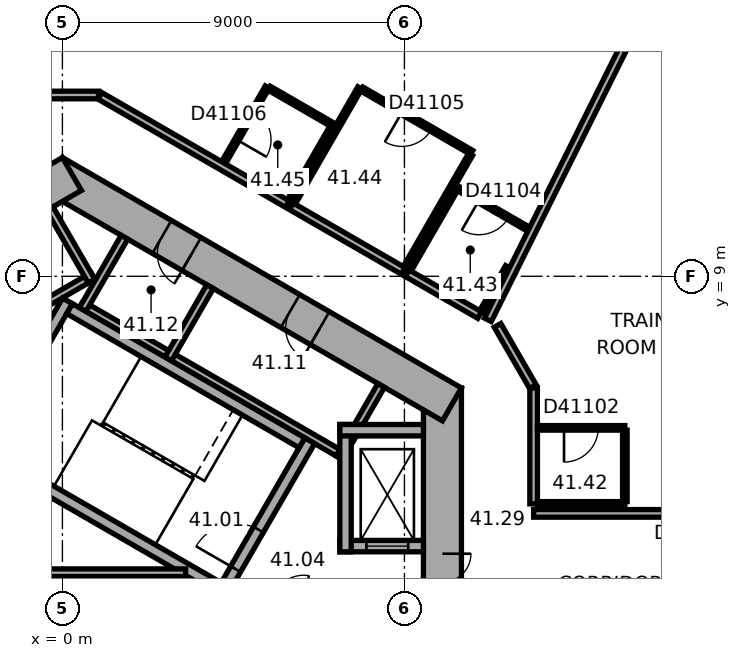
"""IFC4 building model, lengths in metres.
Left out: names, types, materials, properties, quantities, classifications, styles, units other than length and angle.
Written with IfcOpenShell. Run it as: python <this file> out.ifc"""

import sys

from ifc_helpers import new_model, si_unit, direction, frame, frame_2d, origin, place, context, subcontext, project, spatial, rectangle, extrude, element, fill, save


model = new_model("IFC4")
c1 = context("Model", 3, precision=1e-05, world=origin(), true_north=direction((0.0, 1.0)))
c2 = subcontext(c1, "Body", "Model", "MODEL_VIEW")
j1 = project(units=[si_unit("LENGTHUNIT", "METRE"), si_unit("PLANEANGLEUNIT", "RADIAN")], contexts=[c1])
p1 = place(None, origin())
s1 = spatial("IfcSite", under=j1, at=p1, CompositionType="ELEMENT")
p2 = place(p1, origin())
s2 = spatial("IfcBuilding", under=s1, at=p2, CompositionType="ELEMENT")
p3 = place(p2, frame((0.0, 0.0, 168.8)))
s3 = spatial("IfcBuildingStorey", under=s2, at=p3, CompositionType="ELEMENT", Elevation=168.8)
p4 = place(p3, frame((10.0, -6.062, 0.0), z_axis=(0.0, 0.0, 1.0), x_axis=(0.0, 1.0, 0.0)))
e1 = element("IfcWall", 1, at=p4, inside=s3, PredefinedType="SHEAR", context=c2, shape_type="SweptSolid", body=[
    extrude(rectangle(XDim=12.125, YDim=1.0, at=frame_2d((6.062, 0.0))), origin(), (0.0, 0.0, 1.0), 3.7),
])
p5 = place(p4, frame((6.262, 0.0, 0.0)))
e2 = element("IfcOpeningElement", 2, at=p5, cuts=e1, PredefinedType="OPENING", context=c2, shape_type="SweptSolid", body=[
    extrude(rectangle(XDim=1.5, YDim=2.1, at=frame_2d((0.75, 1.05))), frame((0.0, 0.51, 0.0), z_axis=(0.0, -1.0, 0.0), x_axis=(1.0, 0.0, 0.0)), (0.0, 0.0, 1.0), 1.02),
])
p6 = place(p4, frame((1.812, 0.0, 0.0)))
e3 = element("IfcOpeningElement", 3, at=p6, cuts=e1, PredefinedType="OPENING", context=c2, shape_type="SweptSolid", body=[
    extrude(rectangle(XDim=0.9, YDim=2.1, at=frame_2d((0.45, 1.05))), frame((0.0, 0.51, 0.0), z_axis=(0.0, -1.0, 0.0), x_axis=(1.0, 0.0, 0.0)), (0.0, 0.0, 1.0), 1.02),
])
p7 = place(p4, frame((4.412, 0.0, 0.0)))
e4 = element("IfcOpeningElement", 4, at=p7, cuts=e1, PredefinedType="OPENING", context=c2, shape_type="SweptSolid", body=[
    extrude(rectangle(XDim=0.9, YDim=2.1, at=frame_2d((0.45, 1.05))), frame((0.0, 0.51, 0.0), z_axis=(0.0, -1.0, 0.0), x_axis=(1.0, 0.0, 0.0)), (0.0, 0.0, 1.0), 1.02),
])
p8 = place(p3, frame((10.25, 5.629, 0.0), z_axis=(0.0, 0.0, 1.0), x_axis=(-0.866022616891, 0.50000482701, 0.0)))
e5 = element("IfcWall", 5, at=p8, inside=s3, PredefinedType="SHEAR", context=c2, shape_type="SweptSolid", body=[
    extrude(rectangle(XDim=12.125, YDim=1.0, at=frame_2d((6.062, 0.0))), origin(), (0.0, 0.0, 1.0), 3.7),
])
p9 = place(p8, frame((4.012, 0.0, 0.0)))
e6 = element("IfcOpeningElement", 6, at=p9, cuts=e5, PredefinedType="OPENING", context=c2, shape_type="SweptSolid", body=[
    extrude(rectangle(XDim=0.9, YDim=2.1, at=frame_2d((0.45, 1.05))), frame((0.0, 0.51, 0.0), z_axis=(0.0, -1.0, 0.0), x_axis=(1.0, 0.0, 0.0)), (0.0, 0.0, 1.0), 1.02),
])
p10 = place(p8, frame((7.912, 0.0, 0.0)))
e7 = element("IfcOpeningElement", 7, at=p10, cuts=e5, PredefinedType="OPENING", context=c2, shape_type="SweptSolid", body=[
    extrude(rectangle(XDim=0.9, YDim=2.1, at=frame_2d((0.45, 1.05))), frame((0.0, 0.51, 0.0), z_axis=(0.0, -1.0, 0.0), x_axis=(1.0, 0.0, 0.0)), (0.0, 0.0, 1.0), 1.02),
])
p11 = place(p3, frame((0.25, 11.691, 0.0), z_axis=(0.0, 0.0, 1.0), x_axis=(-0.866022616891, -0.50000482701, 0.0)))
e8 = element("IfcWall", 8, at=p11, inside=s3, PredefinedType="SHEAR", context=c2, shape_type="SweptSolid", body=[
    extrude(rectangle(XDim=12.125, YDim=1.0, at=frame_2d((6.062, 0.0))), origin(), (0.0, 0.0, 1.0), 3.7),
])
p12 = place(p11, frame((6.262, 0.0, 0.0)))
e9 = element("IfcOpeningElement", 9, at=p12, cuts=e8, PredefinedType="OPENING", context=c2, shape_type="SweptSolid", body=[
    extrude(rectangle(XDim=1.5, YDim=2.1, at=frame_2d((0.75, 1.05))), frame((0.0, 0.51, 0.0), z_axis=(0.0, -1.0, 0.0), x_axis=(1.0, 0.0, 0.0)), (0.0, 0.0, 1.0), 1.02),
])
p13 = place(p11, frame((3.112, 0.0, 0.0)))
e10 = element("IfcOpeningElement", 10, at=p13, cuts=e8, PredefinedType="OPENING", context=c2, shape_type="SweptSolid", body=[
    extrude(rectangle(XDim=0.9, YDim=2.1, at=frame_2d((0.45, 1.05))), frame((0.0, 0.51, 0.0), z_axis=(0.0, -1.0, 0.0), x_axis=(1.0, 0.0, 0.0)), (0.0, 0.0, 1.0), 1.02),
])
p14 = place(p3, frame((19.464, 14.599, 0.0), z_axis=(0.0, 0.0, 1.0), x_axis=(-0.894935755043, 0.446195018289, 0.0)))
e11 = element("IfcWall", 11, at=p14, inside=s3, PredefinedType="STANDARD", context=c2, shape_type="SweptSolid", body=[
    extrude(rectangle(XDim=20.044, YDim=0.2, at=frame_2d((10.022, 0.0))), origin(), (0.0, 0.0, 1.0), 3.7),
])
p15 = place(p14, frame((1.313, 0.0, 0.9)))
e12 = element("IfcOpeningElement", 12, at=p15, cuts=e11, PredefinedType="OPENING", context=c2, shape_type="SweptSolid", body=[
    extrude(rectangle(XDim=2.4, YDim=2.0, at=frame_2d((1.2, 1.0))), frame((0.0, 0.11, 0.0), z_axis=(0.0, -1.0, 0.0), x_axis=(1.0, 0.0, 0.0)), (0.0, 0.0, 1.0), 0.22),
])
p16 = place(p14, frame((5.067, 0.0, 0.9)))
e13 = element("IfcOpeningElement", 13, at=p16, cuts=e11, PredefinedType="OPENING", context=c2, shape_type="SweptSolid", body=[
    extrude(rectangle(XDim=2.4, YDim=2.0, at=frame_2d((1.2, 1.0))), frame((0.0, 0.11, 0.0), z_axis=(0.0, -1.0, 0.0), x_axis=(1.0, 0.0, 0.0)), (0.0, 0.0, 1.0), 0.22),
])
p17 = place(p14, frame((8.821, 0.0, 0.9)))
e14 = element("IfcOpeningElement", 14, at=p17, cuts=e11, PredefinedType="OPENING", context=c2, shape_type="SweptSolid", body=[
    extrude(rectangle(XDim=2.4, YDim=2.0, at=frame_2d((1.2, 1.0))), frame((0.0, 0.11, 0.0), z_axis=(0.0, -1.0, 0.0), x_axis=(1.0, 0.0, 0.0)), (0.0, 0.0, 1.0), 0.22),
])
p18 = place(p14, frame((12.575, 0.0, 0.9)))
e15 = element("IfcOpeningElement", 15, at=p18, cuts=e11, PredefinedType="OPENING", context=c2, shape_type="SweptSolid", body=[
    extrude(rectangle(XDim=2.4, YDim=2.0, at=frame_2d((1.2, 1.0))), frame((0.0, 0.11, 0.0), z_axis=(0.0, -1.0, 0.0), x_axis=(1.0, 0.0, 0.0)), (0.0, 0.0, 1.0), 0.22),
])
p19 = place(p14, frame((16.329, 0.0, 0.9)))
e16 = element("IfcOpeningElement", 16, at=p19, cuts=e11, PredefinedType="OPENING", context=c2, shape_type="SweptSolid", body=[
    extrude(rectangle(XDim=2.4, YDim=2.0, at=frame_2d((1.2, 1.0))), frame((0.0, 0.11, 0.0), z_axis=(0.0, -1.0, 0.0), x_axis=(1.0, 0.0, 0.0)), (0.0, 0.0, 1.0), 0.22),
])
p20 = place(p3, frame((7.424, 4.259, 0.0), z_axis=(0.0, 0.0, 1.0), x_axis=(-0.866026010844, 0.49999894854, 0.0)))
e17 = element("IfcWall", 17, at=p20, inside=s3, PredefinedType="PARTITIONING", context=c2, shape_type="SweptSolid", body=[
    extrude(rectangle(XDim=8.0, YDim=0.2, at=frame_2d((4.0, 0.0))), origin(), (0.0, 0.0, 1.0), 3.42),
])
for number, where, z_axis, x_axis in (
    (18, (7.287, 4.222, 0.0), (0.0, 0.0, 1.0), (0.5, 0.866, 0.0)),
    (19, (2.784, 6.822, 0.0), (0.0, 0.0, 1.0), (0.5, 0.866, 0.0)),
    (20, (0.532, 8.122, 0.0), (0.0, 0.0, 1.0), (0.5, 0.866, 0.0)),
):
    element("IfcWall", number, at=place(p3, frame(where, z_axis=z_axis, x_axis=x_axis)), inside=s3, PredefinedType="PARTITIONING", context=c2, shape_type="SweptSolid", body=[
        extrude(rectangle(XDim=2.2, YDim=0.2, at=frame_2d((1.1, 0.0))), origin(), (0.0, 0.0, 1.0), 3.42),
    ])
p21 = place(p3, frame((0.803, 9.009, 0.0), z_axis=(0.0, 0.0, 1.0), x_axis=(-0.866028230842, -0.499995103361, 0.0)))
e21 = element("IfcWall", 21, at=p21, inside=s3, PredefinedType="PARTITIONING", context=c2, shape_type="SweptSolid", body=[
    extrude(rectangle(XDim=5.4, YDim=0.2, at=frame_2d((2.7, 0.0))), origin(), (0.0, 0.0, 1.0), 3.42),
])
p22 = place(p3, frame((0.767, 8.872, 0.0), z_axis=(0.0, 0.0, 1.0), x_axis=(-0.499994660107, 0.866028486751, 0.0)))
e22 = element("IfcWall", 22, at=p22, inside=s3, PredefinedType="PARTITIONING", context=c2, shape_type="SweptSolid", body=[
    extrude(rectangle(XDim=2.2, YDim=0.2, at=frame_2d((1.1, 0.0))), origin(), (0.0, 0.0, 1.0), 3.42),
])
p23 = place(p3, frame((4.158, 0.602, 0.0), z_axis=(0.0, 0.0, 1.0), x_axis=(0.499977259774, 0.866038532462, 0.0)))
e23 = element("IfcWall", 23, at=p23, inside=s3, PredefinedType="SHEAR", context=c2, shape_type="SweptSolid", body=[
    extrude(rectangle(XDim=4.7, YDim=0.3, at=frame_2d((2.35, 0.0))), origin(), (0.0, 0.0, 1.0), 3.42),
])
p24 = place(p23, frame((0.8, 0.0, 0.0)))
e24 = element("IfcOpeningElement", 24, at=p24, cuts=e23, PredefinedType="OPENING", context=c2, shape_type="SweptSolid", body=[
    extrude(rectangle(XDim=1.2, YDim=2.1, at=frame_2d((0.6, 1.05))), frame((0.0, 0.16, 0.0), z_axis=(0.0, -1.0, 0.0), x_axis=(1.0, 0.0, 0.0)), (0.0, 0.0, 1.0), 0.32),
])
p25 = place(p3, frame((-2.216, 4.282, 0.0), z_axis=(0.0, 0.0, 1.0), x_axis=(0.499977259774, 0.866038532462, 0.0)))
e25 = element("IfcWall", 25, at=p25, inside=s3, PredefinedType="SHEAR", context=c2, shape_type="SweptSolid", body=[
    extrude(rectangle(XDim=4.7, YDim=0.3, at=frame_2d((2.35, 0.0))), origin(), (0.0, 0.0, 1.0), 3.42),
])
for number, where, z_axis, x_axis in (
    (26, (4.103, 0.807, 0.0), (0.0, 0.0, 1.0), (-0.866, 0.5, 0.0)),
    (27, (6.303, 4.617, 0.0), (0.0, 0.0, 1.0), (-0.866, 0.5, 0.0)),
):
    element("IfcWall", number, at=place(p3, frame(where, z_axis=z_axis, x_axis=x_axis)), inside=s3, PredefinedType="SHEAR", context=c2, shape_type="SweptSolid", body=[
        extrude(rectangle(XDim=7.06, YDim=0.3, at=frame_2d((3.53, 0.0))), origin(), (0.0, 0.0, 1.0), 3.42),
    ])
p26 = place(p3, frame((7.3, 1.9, 0.0), z_axis=(0.0, 0.0, 1.0), x_axis=(1.0, 0.0, 0.0)))
e28 = element("IfcWall", 28, at=p26, inside=s3, PredefinedType="SHEAR", context=c2, shape_type="SweptSolid", body=[
    extrude(rectangle(XDim=2.2, YDim=0.3, at=frame_2d((1.1, 0.0))), origin(), (0.0, 0.0, 1.0), 3.42),
])
p27 = place(p26, frame((0.7, 0.0, 0.0)))
e29 = element("IfcOpeningElement", 29, at=p27, cuts=e28, PredefinedType="OPENING", context=c2, shape_type="SweptSolid", body=[
    extrude(rectangle(XDim=1.1, YDim=2.1, at=frame_2d((0.55, 1.05))), frame((0.0, 0.16, 0.0), z_axis=(0.0, -1.0, 0.0), x_axis=(1.0, 0.0, 0.0)), (0.0, 0.0, 1.0), 0.32),
])
p28 = place(p3, frame((7.45, 1.75, 0.0), z_axis=(0.0, 0.0, 1.0), x_axis=(0.0, 1.0, 0.0)))
e30 = element("IfcWall", 30, at=p28, inside=s3, PredefinedType="SHEAR", context=c2, shape_type="SweptSolid", body=[
    extrude(rectangle(XDim=3.35, YDim=0.3, at=frame_2d((1.675, 0.0))), origin(), (0.0, 0.0, 1.0), 3.42),
])
p29 = place(p3, frame((7.3, 4.95, 0.0), z_axis=(0.0, 0.0, 1.0), x_axis=(1.0, 0.0, 0.0)))
e31 = element("IfcWall", 31, at=p29, inside=s3, PredefinedType="SHEAR", context=c2, shape_type="SweptSolid", body=[
    extrude(rectangle(XDim=2.2, YDim=0.3, at=frame_2d((1.1, 0.0))), origin(), (0.0, 0.0, 1.0), 3.42),
])
p30 = place(p3, frame((-2.72, 1.2, 0.0), z_axis=(0.0, 0.0, 1.0), x_axis=(1.0, 0.0, 0.0)))
e32 = element("IfcWall", 32, at=p30, inside=s3, PredefinedType="PARTITIONING", context=c2, shape_type="SweptSolid", body=[
    extrude(rectangle(XDim=5.961, YDim=0.2, at=frame_2d((2.981, 0.0))), origin(), (0.0, 0.0, 1.0), 3.42),
])
p31 = place(p3, frame((0.95, 13.77, 0.0), z_axis=(0.0, 0.0, 1.0), x_axis=(-1.0, 0.0, 0.0)))
e33 = element("IfcWall", 33, at=p31, inside=s3, PredefinedType="PARTITIONING", context=c2, shape_type="SweptSolid", body=[
    extrude(rectangle(XDim=1.86, YDim=0.2, at=frame_2d((0.93, 0.0))), origin(), (0.0, 0.0, 1.0), 3.42),
])
p32 = place(p3, frame((4.24, 11.986, 0.0), z_axis=(0.0, 0.0, 1.0), x_axis=(0.499952165731, 0.866053019151, 0.0)))
e34 = element("IfcWall", 34, at=p32, inside=s3, PredefinedType="PARTITIONING", context=c2, shape_type="SweptSolid", body=[
    extrude(rectangle(XDim=2.3, YDim=0.12, at=frame_2d((1.15, 0.0))), origin(), (0.0, 0.0, 1.0), 3.42),
])
p33 = place(p32, frame((0.7, 0.0, 0.0)))
e35 = element("IfcOpeningElement", 35, at=p33, cuts=e34, PredefinedType="OPENING", context=c2, shape_type="SweptSolid", body=[
    extrude(rectangle(XDim=0.9, YDim=2.1, at=frame_2d((0.45, 1.05))), frame((0.0, 0.07, 0.0), z_axis=(0.0, -1.0, 0.0), x_axis=(1.0, 0.0, 0.0)), (0.0, 0.0, 1.0), 0.14),
])
p34 = place(p3, frame((5.442, 13.948, 0.0), z_axis=(0.0, 0.0, 1.0), x_axis=(0.866043088465, -0.499969367985, 0.0)))
e36 = element("IfcWall", 36, at=p34, inside=s3, PredefinedType="PARTITIONING", context=c2, shape_type="SweptSolid", body=[
    extrude(rectangle(XDim=1.94, YDim=0.12, at=frame_2d((0.97, 0.0))), origin(), (0.0, 0.0, 1.0), 3.42),
])
p35 = place(p3, frame((5.922, 10.899, 0.0), z_axis=(0.0, 0.0, 1.0), x_axis=(-0.866031556924, 0.499989342298, 0.0)))
e37 = element("IfcWall", 37, at=p35, inside=s3, PredefinedType="PARTITIONING", context=c2, shape_type="SweptSolid", body=[
    extrude(rectangle(XDim=5.701, YDim=0.2, at=frame_2d((2.851, 0.0))), origin(), (0.0, 0.0, 1.0), 3.42),
])
p36 = place(p3, frame((6.076, 10.926, 0.0), z_axis=(0.0, 0.0, 1.0), x_axis=(0.500010275428, 0.866019471182, 0.0)))
e38 = element("IfcWall", 38, at=p36, inside=s3, PredefinedType="PARTITIONING", context=c2, shape_type="SweptSolid", body=[
    extrude(rectangle(XDim=3.5, YDim=0.12, at=frame_2d((1.75, 0.0))), origin(), (0.0, 0.0, 1.0), 3.42),
])
p37 = place(p3, frame((7.092, 12.926, 0.0), z_axis=(0.0, 0.0, 1.0), x_axis=(-0.500030632641, -0.866007717299, 0.0)))
e39 = element("IfcWall", 39, at=p37, inside=s3, PredefinedType="PARTITIONING", context=c2, shape_type="SweptSolid", body=[
    extrude(rectangle(XDim=2.24, YDim=0.12, at=frame_2d((1.12, 0.0))), origin(), (0.0, 0.0, 1.0), 3.42),
])
p38 = place(p3, frame((7.878, 13.927, 0.0), z_axis=(0.0, 0.0, 1.0), x_axis=(0.866021245731, -0.500007201891, 0.0)))
e40 = element("IfcWall", 40, at=p38, inside=s3, PredefinedType="PARTITIONING", context=c2, shape_type="SweptSolid", body=[
    extrude(rectangle(XDim=3.34, YDim=0.12, at=frame_2d((1.67, 0.0))), origin(), (0.0, 0.0, 1.0), 3.42),
])
p39 = place(p38, frame((1.22, 0.0, 0.0)))
e41 = element("IfcOpeningElement", 41, at=p39, cuts=e40, PredefinedType="OPENING", context=c2, shape_type="SweptSolid", body=[
    extrude(rectangle(XDim=0.9, YDim=2.1, at=frame_2d((0.45, 1.05))), frame((0.0, 0.07, 0.0), z_axis=(0.0, -1.0, 0.0), x_axis=(1.0, 0.0, 0.0)), (0.0, 0.0, 1.0), 0.14),
])
p40 = place(p3, frame((8.971, 9.139, 0.0), z_axis=(0.0, 0.0, 1.0), x_axis=(-0.866038511948, 0.499977295307, 0.0)))
e42 = element("IfcWall", 42, at=p40, inside=s3, PredefinedType="PARTITIONING", context=c2, shape_type="SweptSolid", body=[
    extrude(rectangle(XDim=3.4, YDim=0.2, at=frame_2d((1.7, 0.0))), origin(), (0.0, 0.0, 1.0), 3.42),
])
p41 = place(p3, frame((9.125, 9.166, 0.0), z_axis=(0.0, 0.0, 1.0), x_axis=(0.500004234368, 0.866022959057, 0.0)))
e43 = element("IfcWall", 43, at=p41, inside=s3, PredefinedType="PARTITIONING", context=c2, shape_type="SweptSolid", body=[
    extrude(rectangle(XDim=2.5, YDim=0.12, at=frame_2d((1.25, 0.0))), origin(), (0.0, 0.0, 1.0), 3.42),
])
p42 = place(p3, frame((10.427, 11.301, 0.0), z_axis=(0.0, 0.0, 1.0), x_axis=(0.866019511163, -0.500010206181, 0.0)))
e44 = element("IfcWall", 44, at=p42, inside=s3, PredefinedType="PARTITIONING", context=c2, shape_type="SweptSolid", body=[
    extrude(rectangle(XDim=2.13, YDim=0.12, at=frame_2d((1.065, 0.0))), origin(), (0.0, 0.0, 1.0), 3.42),
])
p43 = place(p42, frame((0.615, 0.0, 0.0)))
e45 = element("IfcOpeningElement", 45, at=p43, cuts=e44, PredefinedType="OPENING", context=c2, shape_type="SweptSolid", body=[
    extrude(rectangle(XDim=0.9, YDim=2.1, at=frame_2d((0.45, 1.05))), frame((0.0, 0.07, 0.0), z_axis=(0.0, -1.0, 0.0), x_axis=(1.0, 0.0, 0.0)), (0.0, 0.0, 1.0), 0.14),
])
p44 = place(p3, frame((10.74, 12.205, 0.0), z_axis=(0.0, 0.0, 1.0), x_axis=(-0.499978425106, -0.866037859697, 0.0)))
e46 = element("IfcWall", 46, at=p44, inside=s3, PredefinedType="PARTITIONING", context=c2, shape_type="SweptSolid", body=[
    extrude(rectangle(XDim=3.44, YDim=0.12, at=frame_2d((1.72, 0.0))), origin(), (0.0, 0.0, 1.0), 3.42),
])
p45 = place(p3, frame((10.98, 7.979, 0.0), z_axis=(0.0, 0.0, 1.0), x_axis=(-0.866008176907, 0.50002983664, 0.0)))
e47 = element("IfcWall", 47, at=p45, inside=s3, PredefinedType="PARTITIONING", context=c2, shape_type="SweptSolid", body=[
    extrude(rectangle(XDim=2.2, YDim=0.2, at=frame_2d((1.1, 0.0))), origin(), (0.0, 0.0, 1.0), 3.42),
])
p46 = place(p3, frame((11.714, 9.25, 0.0), z_axis=(0.0, 0.0, 1.0), x_axis=(-0.500015945769, -0.866016197294, 0.0)))
e48 = element("IfcWall", 48, at=p46, inside=s3, PredefinedType="PARTITIONING", context=c2, shape_type="SweptSolid", body=[
    extrude(rectangle(XDim=1.368, YDim=0.12, at=frame_2d((0.684, 0.0))), origin(), (0.0, 0.0, 1.0), 3.42),
])
p47 = place(p3, frame((12.38, 6.097, 0.0), z_axis=(0.0, 0.0, 1.0), x_axis=(-0.499964847546, 0.866045698112, 0.0)))
e49 = element("IfcWall", 49, at=p47, inside=s3, PredefinedType="PARTITIONING", context=c2, shape_type="SweptSolid", body=[
    extrude(rectangle(XDim=1.86, YDim=0.2, at=frame_2d((0.93, 0.0))), origin(), (0.0, 0.0, 1.0), 3.42),
])
p48 = place(p3, frame((12.4, 3.011, 0.0), z_axis=(0.0, 0.0, 1.0), x_axis=(0.0, 1.0, 0.0)))
e50 = element("IfcWall", 50, at=p48, inside=s3, PredefinedType="PARTITIONING", context=c2, shape_type="SweptSolid", body=[
    extrude(rectangle(XDim=3.051, YDim=0.2, at=frame_2d((1.525, 0.0))), origin(), (0.0, 0.0, 1.0), 3.42),
])
p49 = place(p3, frame((12.5, 5.011, 0.0), z_axis=(0.0, 0.0, 1.0), x_axis=(1.0, 0.0, 0.0)))
e51 = element("IfcWall", 51, at=p49, inside=s3, PredefinedType="PARTITIONING", context=c2, shape_type="SweptSolid", body=[
    extrude(rectangle(XDim=2.3, YDim=0.12, at=frame_2d((1.15, 0.0))), origin(), (0.0, 0.0, 1.0), 3.42),
])
p50 = place(p49, frame((0.7, 0.0, 0.0)))
e52 = element("IfcOpeningElement", 52, at=p50, cuts=e51, PredefinedType="OPENING", context=c2, shape_type="SweptSolid", body=[
    extrude(rectangle(XDim=0.9, YDim=2.1, at=frame_2d((0.45, 1.05))), frame((0.0, 0.07, 0.0), z_axis=(0.0, -1.0, 0.0), x_axis=(1.0, 0.0, 0.0)), (0.0, 0.0, 1.0), 0.14),
])
p51 = place(p3, frame((14.8, 3.011, 0.0), z_axis=(0.0, 0.0, 1.0), x_axis=(-1.0, 0.0, 0.0)))
e53 = element("IfcWall", 53, at=p51, inside=s3, PredefinedType="PARTITIONING", context=c2, shape_type="SweptSolid", body=[
    extrude(rectangle(XDim=2.3, YDim=0.12, at=frame_2d((1.15, 0.0))), origin(), (0.0, 0.0, 1.0), 3.42),
])
p52 = place(p3, frame((14.8, 4.951, 0.0), z_axis=(0.0, 0.0, 1.0), x_axis=(0.0, -1.0, 0.0)))
e54 = element("IfcWall", 54, at=p52, inside=s3, PredefinedType="PARTITIONING", context=c2, shape_type="SweptSolid", body=[
    extrude(rectangle(XDim=1.88, YDim=0.12, at=frame_2d((0.94, 0.0))), origin(), (0.0, 0.0, 1.0), 3.42),
])
p53 = place(p3, frame((15.09, 15.663, 0.0), z_axis=(0.0, 0.0, 1.0), x_axis=(-0.446206011687, -0.894930273895, 0.0)))
e55 = element("IfcWall", 55, at=p53, inside=s3, PredefinedType="PARTITIONING", context=c2, shape_type="SweptSolid", body=[
    extrude(rectangle(XDim=8.725, YDim=0.2, at=frame_2d((4.363, 0.0))), origin(), (0.0, 0.0, 1.0), 3.42),
])
p54 = place(p3, frame((20.75, 2.761, 0.0), z_axis=(0.0, 0.0, 1.0), x_axis=(-1.0, 0.0, 0.0)))
e56 = element("IfcWall", 56, at=p54, inside=s3, PredefinedType="PARTITIONING", context=c2, shape_type="SweptSolid", body=[
    extrude(rectangle(XDim=8.35, YDim=0.2, at=frame_2d((4.175, 0.0))), origin(), (0.0, 0.0, 1.0), 3.42),
])
p55 = place(p54, frame((3.675, 0.0, 0.0)))
e57 = element("IfcOpeningElement", 57, at=p55, cuts=e56, PredefinedType="OPENING", context=c2, shape_type="SweptSolid", body=[
    extrude(rectangle(XDim=1.0, YDim=2.1, at=frame_2d((0.5, 1.05))), frame((0.0, 0.11, 0.0), z_axis=(0.0, -1.0, 0.0), x_axis=(1.0, 0.0, 0.0)), (0.0, 0.0, 1.0), 0.22),
])
p56 = place(p5, origin())
e58 = element("IfcDoor", 58, at=p56, inside=s3, OperationType="DOUBLE_DOOR_SINGLE_SWING", PredefinedType="DOOR", context=c2, shape_type="SweptSolid", body=[
    extrude(rectangle(XDim=1.5, YDim=2.1, at=frame_2d((0.75, 1.05))), frame((0.0, 0.025, 0.0), z_axis=(0.0, -1.0, 0.0), x_axis=(1.0, 0.0, 0.0)), (0.0, 0.0, 1.0), 0.05),
])
fill(e2, e58)
p57 = place(p24, origin())
e59 = element("IfcDoor", 59, at=p57, inside=s3, OperationType="SINGLE_SWING_RIGHT", PredefinedType="DOOR", context=c2, shape_type="SweptSolid", body=[
    extrude(rectangle(XDim=1.2, YDim=2.1, at=frame_2d((0.6, 1.05))), frame((0.0, 0.025, 0.0), z_axis=(0.0, -1.0, 0.0), x_axis=(1.0, 0.0, 0.0)), (0.0, 0.0, 1.0), 0.05),
])
fill(e24, e59)
p58 = place(p9, origin())
e60 = element("IfcDoor", 60, at=p58, inside=s3, OperationType="SINGLE_SWING_LEFT", PredefinedType="DOOR", context=c2, shape_type="SweptSolid", body=[
    extrude(rectangle(XDim=0.9, YDim=2.1, at=frame_2d((0.45, 1.05))), frame((0.0, 0.025, 0.0), z_axis=(0.0, -1.0, 0.0), x_axis=(1.0, 0.0, 0.0)), (0.0, 0.0, 1.0), 0.05),
])
fill(e6, e60)
p59 = place(p10, origin())
e61 = element("IfcDoor", 61, at=p59, inside=s3, OperationType="SINGLE_SWING_LEFT", PredefinedType="DOOR", context=c2, shape_type="SweptSolid", body=[
    extrude(rectangle(XDim=0.9, YDim=2.1, at=frame_2d((0.45, 1.05))), frame((0.0, 0.025, 0.0), z_axis=(0.0, -1.0, 0.0), x_axis=(1.0, 0.0, 0.0)), (0.0, 0.0, 1.0), 0.05),
])
fill(e7, e61)
p60 = place(p27, origin())
e62 = element("IfcDoor", 62, at=p60, inside=s3, OperationType="DOUBLE_DOOR_SLIDING", PredefinedType="DOOR", context=c2, shape_type="SweptSolid", body=[
    extrude(rectangle(XDim=1.1, YDim=2.1, at=frame_2d((0.55, 1.05))), frame((0.0, 0.025, 0.0), z_axis=(0.0, -1.0, 0.0), x_axis=(1.0, 0.0, 0.0)), (0.0, 0.0, 1.0), 0.05),
])
fill(e29, e62)
p61 = place(p50, origin())
e63 = element("IfcDoor", 63, at=p61, inside=s3, OperationType="SINGLE_SWING_LEFT", PredefinedType="DOOR", context=c2, shape_type="SweptSolid", body=[
    extrude(rectangle(XDim=0.9, YDim=2.1, at=frame_2d((0.45, 1.05))), frame((0.0, 0.025, 0.0), z_axis=(0.0, -1.0, 0.0), x_axis=(1.0, 0.0, 0.0)), (0.0, 0.0, 1.0), 0.05),
])
fill(e52, e63)
p62 = place(p43, origin())
e64 = element("IfcDoor", 64, at=p62, inside=s3, OperationType="SINGLE_SWING_LEFT", PredefinedType="DOOR", context=c2, shape_type="SweptSolid", body=[
    extrude(rectangle(XDim=0.9, YDim=2.1, at=frame_2d((0.45, 1.05))), frame((0.0, 0.025, 0.0), z_axis=(0.0, -1.0, 0.0), x_axis=(1.0, 0.0, 0.0)), (0.0, 0.0, 1.0), 0.05),
])
fill(e45, e64)
p63 = place(p39, origin())
e65 = element("IfcDoor", 65, at=p63, inside=s3, OperationType="SINGLE_SWING_LEFT", PredefinedType="DOOR", context=c2, shape_type="SweptSolid", body=[
    extrude(rectangle(XDim=0.9, YDim=2.1, at=frame_2d((0.45, 1.05))), frame((0.0, 0.025, 0.0), z_axis=(0.0, -1.0, 0.0), x_axis=(1.0, 0.0, 0.0)), (0.0, 0.0, 1.0), 0.05),
])
fill(e41, e65)
p64 = place(p33, origin())
e66 = element("IfcDoor", 66, at=p64, inside=s3, OperationType="SINGLE_SWING_LEFT", PredefinedType="DOOR", context=c2, shape_type="SweptSolid", body=[
    extrude(rectangle(XDim=0.9, YDim=2.1, at=frame_2d((0.45, 1.05))), frame((0.0, 0.025, 0.0), z_axis=(0.0, -1.0, 0.0), x_axis=(1.0, 0.0, 0.0)), (0.0, 0.0, 1.0), 0.05),
])
fill(e35, e66)
save(model, sys.argv[1])
